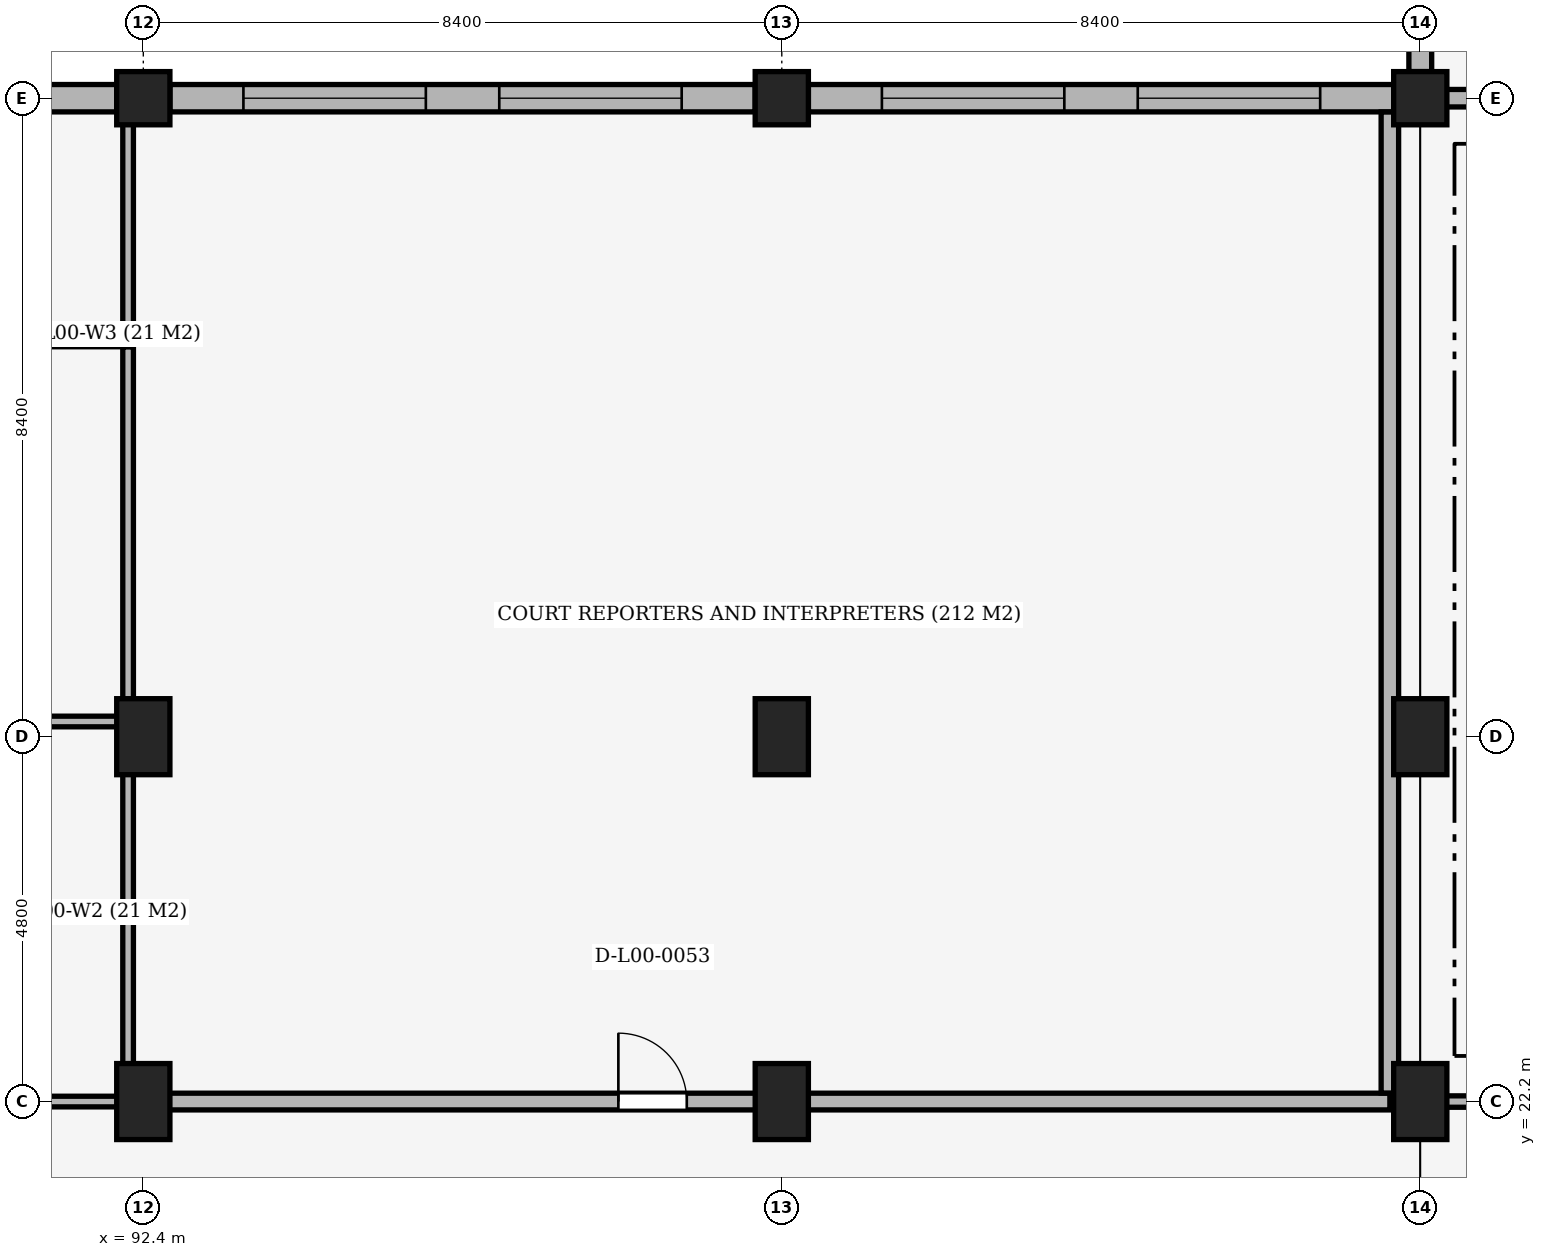
"""IFC4 building model, lengths in metres.
Left out: names, types, materials, properties, quantities, classifications, styles, units other than length and angle.
Written with IfcOpenShell. Run it as: python <this file> out.ifc"""

import sys

from ifc_helpers import new_model, si_unit, direction, frame, frame_2d, origin, origin_2d, place, context, subcontext, project, spatial, rectangle, extrude, element, fill, save


model = new_model("IFC4")
c1 = context("Model", 3, precision=1e-05, world=origin(), true_north=direction((0.0, 1.0)))
c2 = subcontext(c1, "Body", "Model", "MODEL_VIEW")
j1 = project(units=[si_unit("LENGTHUNIT", "METRE"), si_unit("PLANEANGLEUNIT", "RADIAN")], contexts=[c1])
p1 = place(None, origin())
s1 = spatial("IfcSite", under=j1, at=p1, CompositionType="ELEMENT")
p2 = place(p1, origin())
s2 = spatial("IfcBuilding", under=s1, at=p2, CompositionType="ELEMENT")
p3 = place(p2, origin())
s3 = spatial("IfcBuildingStorey", under=s2, at=p3, CompositionType="ELEMENT", Elevation=0.0)
for number, where, z_axis, x_axis in (
    (1, (92.4, 22.2, 0.0), (0.0, 0.0, 1.0), (1.0, 0.0, 0.0)),
    (2, (92.4, 27.0, 0.0), (0.0, 0.0, 1.0), (1.0, 0.0, 0.0)),
):
    element("IfcColumn", number, at=place(p3, frame(where, z_axis=z_axis, x_axis=x_axis)), inside=s3, PredefinedType="COLUMN", context=c2, shape_type="SweptSolid", body=[
        extrude(rectangle(XDim=0.7, YDim=1.0, at=origin_2d()), origin(), (0.0, 0.0, 1.0), 5.1),
    ])
p4 = place(p3, frame((92.4, 35.4, 0.0), z_axis=(0.0, 0.0, 1.0), x_axis=(1.0, 0.0, 0.0)))
e3 = element("IfcColumn", 3, at=p4, inside=s3, PredefinedType="COLUMN", context=c2, shape_type="SweptSolid", body=[
    extrude(rectangle(XDim=0.7, YDim=0.7, at=origin_2d()), origin(), (0.0, 0.0, 1.0), 5.1),
])
for number, where, z_axis, x_axis in (
    (4, (100.8, 22.2, 0.0), (0.0, 0.0, 1.0), (1.0, 0.0, 0.0)),
    (5, (100.8, 27.0, 0.0), (0.0, 0.0, 1.0), (1.0, 0.0, 0.0)),
):
    element("IfcColumn", number, at=place(p3, frame(where, z_axis=z_axis, x_axis=x_axis)), inside=s3, PredefinedType="COLUMN", context=c2, shape_type="SweptSolid", body=[
        extrude(rectangle(XDim=0.7, YDim=1.0, at=origin_2d()), origin(), (0.0, 0.0, 1.0), 5.1),
    ])
p5 = place(p3, frame((100.8, 35.4, 0.0), z_axis=(0.0, 0.0, 1.0), x_axis=(1.0, 0.0, 0.0)))
e6 = element("IfcColumn", 6, at=p5, inside=s3, PredefinedType="COLUMN", context=c2, shape_type="SweptSolid", body=[
    extrude(rectangle(XDim=0.7, YDim=0.7, at=origin_2d()), origin(), (0.0, 0.0, 1.0), 5.1),
])
for number, where, z_axis, x_axis in (
    (7, (109.2, 22.2, 0.0), (0.0, 0.0, 1.0), (1.0, 0.0, 0.0)),
    (8, (109.2, 27.0, 0.0), (0.0, 0.0, 1.0), (1.0, 0.0, 0.0)),
):
    element("IfcColumn", number, at=place(p3, frame(where, z_axis=z_axis, x_axis=x_axis)), inside=s3, PredefinedType="COLUMN", context=c2, shape_type="SweptSolid", body=[
        extrude(rectangle(XDim=0.7, YDim=1.0, at=origin_2d()), origin(), (0.0, 0.0, 1.0), 5.1),
    ])
p6 = place(p3, frame((109.2, 35.4, 0.0), z_axis=(0.0, 0.0, 1.0), x_axis=(1.0, 0.0, 0.0)))
e9 = element("IfcColumn", 9, at=p6, inside=s3, PredefinedType="COLUMN", context=c2, shape_type="SweptSolid", body=[
    extrude(rectangle(XDim=0.7, YDim=0.7, at=origin_2d()), origin(), (0.0, 0.0, 1.0), 5.1),
])
p7 = place(p3, frame((109.2, 35.75, 0.0), z_axis=(0.0, 0.0, 1.0), x_axis=(0.0, 1.0, 0.0)))
e10 = element("IfcWall", 10, at=p7, inside=s3, PredefinedType="SOLIDWALL", context=c2, shape_type="SweptSolid", body=[
    extrude(rectangle(XDim=4.825, YDim=0.3, at=frame_2d((2.413, 0.0))), origin(), (0.0, 0.0, 1.0), 4.17),
])
p8 = place(p7, frame((0.675, 0.0, 0.85)))
e11 = element("IfcOpeningElement", 11, at=p8, cuts=e10, PredefinedType="OPENING", context=c2, shape_type="SweptSolid", body=[
    extrude(rectangle(XDim=1.4, YDim=2.4, at=frame_2d((0.7, 1.2))), frame((0.0, 0.165, 0.0), z_axis=(0.0, -1.0, 0.0), x_axis=(1.0, 0.0, 0.0)), (0.0, 0.0, 1.0), 0.33),
])
p9 = place(p7, frame((2.75, 0.0, 0.85)))
e12 = element("IfcOpeningElement", 12, at=p9, cuts=e10, PredefinedType="OPENING", context=c2, shape_type="SweptSolid", body=[
    extrude(rectangle(XDim=1.4, YDim=2.4, at=frame_2d((0.7, 1.2))), frame((0.0, 0.165, 0.0), z_axis=(0.0, -1.0, 0.0), x_axis=(1.0, 0.0, 0.0)), (0.0, 0.0, 1.0), 0.33),
])
p10 = place(p3, frame((84.35, 35.4, 0.0), z_axis=(0.0, 0.0, 1.0), x_axis=(1.0, 0.0, 0.0)))
e13 = element("IfcWall", 13, at=p10, inside=s3, PredefinedType="SOLIDWALL", context=c2, shape_type="SweptSolid", body=[
    extrude(rectangle(XDim=7.7, YDim=0.36, at=frame_2d((3.85, 0.0))), origin(), (0.0, 0.0, 1.0), 4.07),
])
p11 = place(p10, frame((0.967, 0.0, 0.85)))
e14 = element("IfcOpeningElement", 14, at=p11, cuts=e13, PredefinedType="OPENING", context=c2, shape_type="SweptSolid", body=[
    extrude(rectangle(XDim=2.4, YDim=2.4, at=frame_2d((1.2, 1.2))), frame((0.0, 0.195, 0.0), z_axis=(0.0, -1.0, 0.0), x_axis=(1.0, 0.0, 0.0)), (0.0, 0.0, 1.0), 0.39),
])
p12 = place(p10, frame((4.333, 0.0, 0.85)))
e15 = element("IfcOpeningElement", 15, at=p12, cuts=e13, PredefinedType="OPENING", context=c2, shape_type="SweptSolid", body=[
    extrude(rectangle(XDim=2.4, YDim=2.4, at=frame_2d((1.2, 1.2))), frame((0.0, 0.195, 0.0), z_axis=(0.0, -1.0, 0.0), x_axis=(1.0, 0.0, 0.0)), (0.0, 0.0, 1.0), 0.39),
])
p13 = place(p3, frame((92.75, 35.4, 0.0), z_axis=(0.0, 0.0, 1.0), x_axis=(1.0, 0.0, 0.0)))
e16 = element("IfcWall", 16, at=p13, inside=s3, PredefinedType="SOLIDWALL", context=c2, shape_type="SweptSolid", body=[
    extrude(rectangle(XDim=7.7, YDim=0.36, at=frame_2d((3.85, 0.0))), origin(), (0.0, 0.0, 1.0), 4.07),
])
p14 = place(p13, frame((0.967, 0.0, 0.85)))
e17 = element("IfcOpeningElement", 17, at=p14, cuts=e16, PredefinedType="OPENING", context=c2, shape_type="SweptSolid", body=[
    extrude(rectangle(XDim=2.4, YDim=2.4, at=frame_2d((1.2, 1.2))), frame((0.0, 0.195, 0.0), z_axis=(0.0, -1.0, 0.0), x_axis=(1.0, 0.0, 0.0)), (0.0, 0.0, 1.0), 0.39),
])
p15 = place(p13, frame((4.333, 0.0, 0.85)))
e18 = element("IfcOpeningElement", 18, at=p15, cuts=e16, PredefinedType="OPENING", context=c2, shape_type="SweptSolid", body=[
    extrude(rectangle(XDim=2.4, YDim=2.4, at=frame_2d((1.2, 1.2))), frame((0.0, 0.195, 0.0), z_axis=(0.0, -1.0, 0.0), x_axis=(1.0, 0.0, 0.0)), (0.0, 0.0, 1.0), 0.39),
])
p16 = place(p3, frame((101.15, 35.4, 0.0), z_axis=(0.0, 0.0, 1.0), x_axis=(1.0, 0.0, 0.0)))
e19 = element("IfcWall", 19, at=p16, inside=s3, PredefinedType="SOLIDWALL", context=c2, shape_type="SweptSolid", body=[
    extrude(rectangle(XDim=7.7, YDim=0.36, at=frame_2d((3.85, 0.0))), origin(), (0.0, 0.0, 1.0), 4.07),
])
p17 = place(p16, frame((0.967, 0.0, 0.85)))
e20 = element("IfcOpeningElement", 20, at=p17, cuts=e19, PredefinedType="OPENING", context=c2, shape_type="SweptSolid", body=[
    extrude(rectangle(XDim=2.4, YDim=2.4, at=frame_2d((1.2, 1.2))), frame((0.0, 0.195, 0.0), z_axis=(0.0, -1.0, 0.0), x_axis=(1.0, 0.0, 0.0)), (0.0, 0.0, 1.0), 0.39),
])
p18 = place(p16, frame((4.333, 0.0, 0.85)))
e21 = element("IfcOpeningElement", 21, at=p18, cuts=e19, PredefinedType="OPENING", context=c2, shape_type="SweptSolid", body=[
    extrude(rectangle(XDim=2.4, YDim=2.4, at=frame_2d((1.2, 1.2))), frame((0.0, 0.195, 0.0), z_axis=(0.0, -1.0, 0.0), x_axis=(1.0, 0.0, 0.0)), (0.0, 0.0, 1.0), 0.39),
])
p19 = place(p3, frame((88.0, 22.2, 0.0), z_axis=(0.0, 0.0, 1.0), x_axis=(1.0, 0.0, 0.0)))
e22 = element("IfcWall", 22, at=p19, inside=s3, PredefinedType="PARTITIONING", context=c2, shape_type="SweptSolid", body=[
    extrude(rectangle(XDim=4.2, YDim=0.14, at=frame_2d((2.1, 0.0))), origin(), (0.0, 0.0, 1.0), 4.07),
])
p20 = place(p19, frame((1.65, 0.0, 0.0)))
e23 = element("IfcOpeningElement", 23, at=p20, cuts=e22, PredefinedType="OPENING", context=c2, shape_type="SweptSolid", body=[
    extrude(rectangle(XDim=0.9, YDim=2.1, at=frame_2d((0.45, 1.05))), frame((0.0, 0.085, 0.0), z_axis=(0.0, -1.0, 0.0), x_axis=(1.0, 0.0, 0.0)), (0.0, 0.0, 1.0), 0.17),
])
p21 = place(p3, frame((92.2, 22.2, 0.0), z_axis=(0.0, 0.0, 1.0), x_axis=(1.0, 0.0, 0.0)))
e24 = element("IfcWall", 24, at=p21, inside=s3, PredefinedType="PARTITIONING", context=c2, shape_type="SweptSolid", body=[
    extrude(rectangle(XDim=16.6, YDim=0.22, at=frame_2d((8.3, 0.0))), origin(), (0.0, 0.0, 1.0), 4.07),
])
p22 = place(p21, frame((6.45, 0.0, 0.0)))
e25 = element("IfcOpeningElement", 25, at=p22, cuts=e24, PredefinedType="OPENING", context=c2, shape_type="SweptSolid", body=[
    extrude(rectangle(XDim=0.9, YDim=2.2, at=frame_2d((0.45, 1.1))), frame((0.0, 0.125, 0.0), z_axis=(0.0, -1.0, 0.0), x_axis=(1.0, 0.0, 0.0)), (0.0, 0.0, 1.0), 0.25),
])
p23 = place(p3, frame((109.2, 22.2, 0.0), z_axis=(0.0, 0.0, 1.0), x_axis=(1.0, 0.0, 0.0)))
e26 = element("IfcWall", 26, at=p23, inside=s3, PredefinedType="PARTITIONING", context=c2, shape_type="SweptSolid", body=[
    extrude(rectangle(XDim=7.3, YDim=0.15, at=frame_2d((3.65, 0.0))), origin(), (0.0, 0.0, 1.0), 4.07),
])
p24 = place(p3, frame((88.0, 27.2, 0.0), z_axis=(0.0, 0.0, 1.0), x_axis=(1.0, 0.0, 0.0)))
e27 = element("IfcWall", 27, at=p24, inside=s3, PredefinedType="PARTITIONING", context=c2, shape_type="SweptSolid", body=[
    extrude(rectangle(XDim=4.2, YDim=0.14, at=frame_2d((2.1, 0.0))), origin(), (0.0, 0.0, 1.0), 4.07),
])
p25 = place(p3, frame((88.0, 32.2, 0.0), z_axis=(0.0, 0.0, 1.0), x_axis=(1.0, 0.0, 0.0)))
e28 = element("IfcWall", 28, at=p25, inside=s3, PredefinedType="PARTITIONING", context=c2, shape_type="SweptSolid", body=[
    extrude(rectangle(XDim=4.2, YDim=0.14, at=frame_2d((2.1, 0.0))), origin(), (0.0, 0.0, 1.0), 4.02),
])
p26 = place(p3, frame((109.213, 35.4, 0.0), z_axis=(0.0, 0.0, 1.0), x_axis=(1.0, 0.0, 0.0)))
e29 = element("IfcWall", 29, at=p26, inside=s3, PredefinedType="SOLIDWALL", context=c2, shape_type="SweptSolid", body=[
    extrude(rectangle(XDim=7.287, YDim=0.23, at=frame_2d((3.644, 0.0))), origin(), (0.0, 0.0, 1.0), 4.07),
])
p27 = place(p3, frame((92.2, 22.312, 0.0), z_axis=(0.0, 0.0, 1.0), x_axis=(0.0, 1.0, 0.0)))
e30 = element("IfcWall", 30, at=p27, inside=s3, PredefinedType="PARTITIONING", context=c2, shape_type="SweptSolid", body=[
    extrude(rectangle(XDim=4.816, YDim=0.14, at=frame_2d((2.408, 0.0))), origin(), (0.0, 0.0, 1.0), 4.07),
])
p28 = place(p3, frame((92.2, 27.272, 0.0), z_axis=(0.0, 0.0, 1.0), x_axis=(0.0, 1.0, 0.0)))
e31 = element("IfcWall", 31, at=p28, inside=s3, PredefinedType="PARTITIONING", context=c2, shape_type="SweptSolid", body=[
    extrude(rectangle(XDim=4.856, YDim=0.14, at=frame_2d((2.428, 0.0))), origin(), (0.0, 0.0, 1.0), 4.02),
])
p29 = place(p3, frame((92.2, 32.272, 0.0), z_axis=(0.0, 0.0, 1.0), x_axis=(0.0, 1.0, 0.0)))
e32 = element("IfcWall", 32, at=p29, inside=s3, PredefinedType="PARTITIONING", context=c2, shape_type="SweptSolid", body=[
    extrude(rectangle(XDim=2.98, YDim=0.14, at=frame_2d((1.49, 0.0))), origin(), (0.0, 0.0, 1.0), 4.02),
])
p30 = place(p3, frame((108.8, 22.312, 0.0), z_axis=(0.0, 0.0, 1.0), x_axis=(0.0, 1.0, 0.0)))
e33 = element("IfcWall", 33, at=p30, inside=s3, PredefinedType="SOLIDWALL", context=c2, shape_type="SweptSolid", body=[
    extrude(rectangle(XDim=12.906, YDim=0.23, at=frame_2d((6.453, 0.0))), origin(), (0.0, 0.0, 1.0), 4.07),
])
p31 = place(p14, origin())
e34 = element("IfcWindow", 34, at=p31, inside=s3, PartitioningType="SINGLE_PANEL", PredefinedType="WINDOW", context=c2, shape_type="SweptSolid", body=[
    extrude(rectangle(XDim=2.4, YDim=2.4, at=frame_2d((1.2, 1.2))), frame((0.0, 0.03, 0.0), z_axis=(0.0, -1.0, 0.0), x_axis=(1.0, 0.0, 0.0)), (0.0, 0.0, 1.0), 0.06),
])
fill(e17, e34)
p32 = place(p15, origin())
e35 = element("IfcWindow", 35, at=p32, inside=s3, PartitioningType="SINGLE_PANEL", PredefinedType="WINDOW", context=c2, shape_type="SweptSolid", body=[
    extrude(rectangle(XDim=2.4, YDim=2.4, at=frame_2d((1.2, 1.2))), frame((0.0, 0.03, 0.0), z_axis=(0.0, -1.0, 0.0), x_axis=(1.0, 0.0, 0.0)), (0.0, 0.0, 1.0), 0.06),
])
fill(e18, e35)
p33 = place(p17, origin())
e36 = element("IfcWindow", 36, at=p33, inside=s3, PartitioningType="SINGLE_PANEL", PredefinedType="WINDOW", context=c2, shape_type="SweptSolid", body=[
    extrude(rectangle(XDim=2.4, YDim=2.4, at=frame_2d((1.2, 1.2))), frame((0.0, 0.03, 0.0), z_axis=(0.0, -1.0, 0.0), x_axis=(1.0, 0.0, 0.0)), (0.0, 0.0, 1.0), 0.06),
])
fill(e20, e36)
p34 = place(p18, origin())
e37 = element("IfcWindow", 37, at=p34, inside=s3, PartitioningType="SINGLE_PANEL", PredefinedType="WINDOW", context=c2, shape_type="SweptSolid", body=[
    extrude(rectangle(XDim=2.4, YDim=2.4, at=frame_2d((1.2, 1.2))), frame((0.0, 0.03, 0.0), z_axis=(0.0, -1.0, 0.0), x_axis=(1.0, 0.0, 0.0)), (0.0, 0.0, 1.0), 0.06),
])
fill(e21, e37)
p35 = place(p22, origin())
e38 = element("IfcDoor", 38, at=p35, inside=s3, OperationType="SINGLE_SWING_LEFT", PredefinedType="DOOR", context=c2, shape_type="SweptSolid", body=[
    extrude(rectangle(XDim=0.9, YDim=2.2, at=frame_2d((0.45, 1.1))), frame((0.0, 0.025, 0.0), z_axis=(0.0, -1.0, 0.0), x_axis=(1.0, 0.0, 0.0)), (0.0, 0.0, 1.0), 0.05),
])
fill(e25, e38)
save(model, sys.argv[1])
